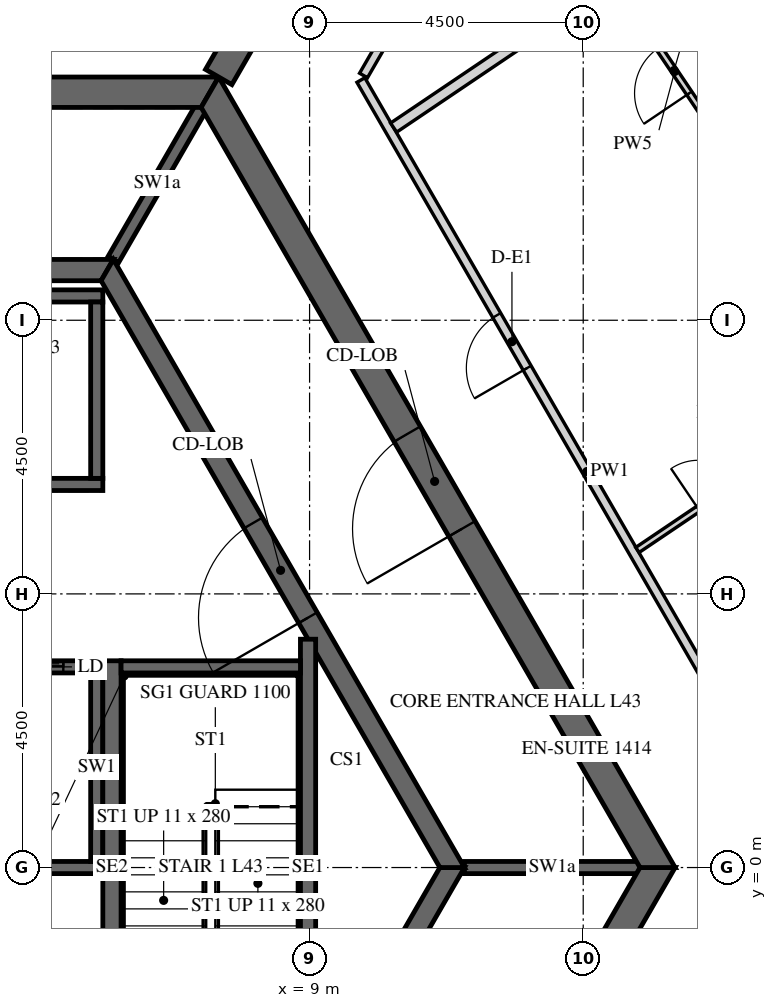
"""IFC4 building model, lengths in metres.
Left out: names, types, materials, properties, quantities, classifications, styles, units other than length and angle.
Written with IfcOpenShell. Run it as: python <this file> out.ifc"""

import sys

from ifc_helpers import new_model, si_unit, direction, frame, frame_2d, origin, place, context, subcontext, project, spatial, polyline, rectangle, outline, extrude, element, fill, save


model = new_model("IFC4")
c1 = context("Model", 3, precision=1e-05, world=origin(), true_north=direction((0.0, 1.0)))
c2 = subcontext(c1, "Body", "Model", "MODEL_VIEW")
j1 = project(units=[si_unit("LENGTHUNIT", "METRE"), si_unit("PLANEANGLEUNIT", "RADIAN")], contexts=[c1])
p1 = place(None, origin())
s1 = spatial("IfcSite", under=j1, at=p1, CompositionType="ELEMENT")
p2 = place(p1, origin())
s2 = spatial("IfcBuilding", under=s1, at=p2, CompositionType="ELEMENT")
p3 = place(p2, frame((0.0, 0.0, 183.9)))
s3 = spatial("IfcBuildingStorey", under=s2, at=p3, CompositionType="ELEMENT", Elevation=183.9)
p4 = place(p3, frame((7.361, -12.75, -0.15), z_axis=(0.0, 0.0, 1.0), x_axis=(0.50000571537, 0.866022103989, 0.0)))
e1 = element("IfcWall", 1, at=p4, inside=s3, PredefinedType="SHEAR", context=c2, shape_type="SweptSolid", body=[
    extrude(outline(polyline([(-0.144, -0.25), (14.867, -0.25), (14.578, 0.25), (0.144, 0.25), (-0.144, -0.25)])), origin(), (0.0, 0.0, 1.0), 3.9),
])
p5 = place(p4, frame((6.49, 0.0, 0.15)))
e2 = element("IfcOpeningElement", 2, at=p5, cuts=e1, PredefinedType="OPENING", context=c2, shape_type="SweptSolid", body=[
    extrude(rectangle(XDim=1.8, YDim=2.4, at=frame_2d((0.9, 1.2))), frame((0.0, 0.26, 0.0), z_axis=(0.0, -1.0, 0.0), x_axis=(1.0, 0.0, 0.0)), (0.0, 0.0, 1.0), 0.52),
])
p6 = place(p3, frame((14.722, 0.0, -0.15), z_axis=(0.0, 0.0, 1.0), x_axis=(-0.50000571537, 0.866022103989, 0.0)))
e3 = element("IfcWall", 3, at=p6, inside=s3, PredefinedType="SHEAR", context=c2, shape_type="SweptSolid", body=[
    extrude(outline(polyline([(-0.144, -0.25), (14.867, -0.25), (14.578, 0.25), (0.144, 0.25), (-0.144, -0.25)])), origin(), (0.0, 0.0, 1.0), 3.9),
])
p7 = place(p6, frame((6.432, 0.0, 0.15)))
e4 = element("IfcOpeningElement", 4, at=p7, cuts=e3, PredefinedType="OPENING", context=c2, shape_type="SweptSolid", body=[
    extrude(rectangle(XDim=1.8, YDim=2.4, at=frame_2d((0.9, 1.2))), frame((0.0, 0.26, 0.0), z_axis=(0.0, -1.0, 0.0), x_axis=(1.0, 0.0, 0.0)), (0.0, 0.0, 1.0), 0.52),
])
p8 = place(p3, frame((7.361, 12.75, -0.15), z_axis=(0.0, 0.0, 1.0), x_axis=(-1.0, 0.0, 0.0)))
e5 = element("IfcWall", 5, at=p8, inside=s3, PredefinedType="SHEAR", context=c2, shape_type="SweptSolid", body=[
    extrude(outline(polyline([(-0.144, -0.25), (14.866, -0.25), (14.578, 0.25), (0.144, 0.25), (-0.144, -0.25)])), origin(), (0.0, 0.0, 1.0), 3.9),
])
p9 = place(p8, frame((6.761, 0.0, 0.15)))
e6 = element("IfcOpeningElement", 6, at=p9, cuts=e5, PredefinedType="OPENING", context=c2, shape_type="SweptSolid", body=[
    extrude(rectangle(XDim=1.2, YDim=2.4, at=frame_2d((0.6, 1.2))), frame((0.0, 0.26, 0.0), z_axis=(0.0, -1.0, 0.0), x_axis=(1.0, 0.0, 0.0)), (0.0, 0.0, 1.0), 0.52),
])
p10 = place(p3, frame((7.506, 13.0, -0.15), z_axis=(0.0, 0.0, 1.0), x_axis=(0.499988271576, 0.866032175087, 0.0)))
e7 = element("IfcWall", 7, at=p10, inside=s3, PredefinedType="SHEAR", context=c2, shape_type="SweptSolid", body=[
    extrude(rectangle(XDim=15.424, YDim=0.5, at=frame_2d((7.712, 0.0))), origin(), (0.0, 0.0, 1.0), 3.9),
])
p11 = place(p10, frame((6.812, 0.0, 0.15)))
e8 = element("IfcOpeningElement", 8, at=p11, cuts=e7, PredefinedType="OPENING", context=c2, shape_type="SweptSolid", body=[
    extrude(rectangle(XDim=1.8, YDim=2.4, at=frame_2d((0.9, 1.2))), frame((0.0, 0.26, 0.0), z_axis=(0.0, -1.0, 0.0), x_axis=(1.0, 0.0, 0.0)), (0.0, 0.0, 1.0), 0.52),
])
p12 = place(p3, frame((5.673, -9.825, -0.15), z_axis=(0.0, 0.0, 1.0), x_axis=(0.499995046907, 0.866028263435, 0.0)))
e9 = element("IfcWall", 9, at=p12, inside=s3, PredefinedType="SHEAR", context=c2, shape_type="SweptSolid", body=[
    extrude(outline(polyline([(-0.101, -0.175), (11.446, -0.175), (11.244, 0.175), (0.101, 0.175), (-0.101, -0.175)])), origin(), (0.0, 0.0, 1.0), 3.9),
])
p13 = place(p12, frame((4.801, 0.0, 0.15)))
e10 = element("IfcOpeningElement", 10, at=p13, cuts=e9, PredefinedType="OPENING", context=c2, shape_type="SweptSolid", body=[
    extrude(rectangle(XDim=1.8, YDim=2.4, at=frame_2d((0.9, 1.2))), frame((0.0, 0.185, 0.0), z_axis=(0.0, -1.0, 0.0), x_axis=(1.0, 0.0, 0.0)), (0.0, 0.0, 1.0), 0.37),
])
p14 = place(p3, frame((11.345, 0.0, -0.15), z_axis=(0.0, 0.0, 1.0), x_axis=(-0.499995046907, 0.866028263435, 0.0)))
e11 = element("IfcWall", 11, at=p14, inside=s3, PredefinedType="SHEAR", context=c2, shape_type="SweptSolid", body=[
    extrude(outline(polyline([(-0.101, -0.175), (11.446, -0.175), (11.244, 0.175), (0.101, 0.175), (-0.101, -0.175)])), origin(), (0.0, 0.0, 1.0), 3.9),
])
p15 = place(p14, frame((4.744, 0.0, 0.15)))
e12 = element("IfcOpeningElement", 12, at=p15, cuts=e11, PredefinedType="OPENING", context=c2, shape_type="SweptSolid", body=[
    extrude(rectangle(XDim=1.8, YDim=2.4, at=frame_2d((0.9, 1.2))), frame((0.0, 0.185, 0.0), z_axis=(0.0, -1.0, 0.0), x_axis=(1.0, 0.0, 0.0)), (0.0, 0.0, 1.0), 0.37),
])
p16 = place(p3, frame((5.673, 9.825, -0.15), z_axis=(0.0, 0.0, 1.0), x_axis=(-1.0, 0.0, 0.0)))
e13 = element("IfcWall", 13, at=p16, inside=s3, PredefinedType="SHEAR", context=c2, shape_type="SweptSolid", body=[
    extrude(outline(polyline([(-0.101, -0.175), (11.446, -0.175), (11.244, 0.175), (0.101, 0.175), (-0.101, -0.175)])), origin(), (0.0, 0.0, 1.0), 3.9),
])
p17 = place(p3, frame((-5.6, 6.3, -0.25), z_axis=(0.0, 0.0, 1.0), x_axis=(1.0, 0.0, 0.0)))
e14 = element("IfcWall", 14, at=p17, inside=s3, PredefinedType="SHEAR", context=c2, shape_type="SweptSolid", body=[
    extrude(rectangle(XDim=11.2, YDim=0.2, at=frame_2d((5.6, 0.0))), origin(), (0.0, 0.0, 1.0), 3.9),
])
p18 = place(p17, frame((8.45, 0.0, 0.25)))
e15 = element("IfcOpeningElement", 15, at=p18, cuts=e14, PredefinedType="OPENING", context=c2, shape_type="SweptSolid", body=[
    extrude(rectangle(XDim=0.9, YDim=2.1, at=frame_2d((0.45, 1.05))), frame((0.0, 0.11, 0.0), z_axis=(0.0, -1.0, 0.0), x_axis=(1.0, 0.0, 0.0)), (0.0, 0.0, 1.0), 0.22),
])
p19 = place(p17, frame((0.65, 0.0, 0.25)))
e16 = element("IfcOpeningElement", 16, at=p19, cuts=e14, PredefinedType="OPENING", context=c2, shape_type="SweptSolid", body=[
    extrude(rectangle(XDim=1.1, YDim=2.1, at=frame_2d((0.55, 1.05))), frame((0.0, 0.11, 0.0), z_axis=(0.0, -1.0, 0.0), x_axis=(1.0, 0.0, 0.0)), (0.0, 0.0, 1.0), 0.22),
])
p20 = place(p17, frame((2.85, 0.0, 0.25)))
e17 = element("IfcOpeningElement", 17, at=p20, cuts=e14, PredefinedType="OPENING", context=c2, shape_type="SweptSolid", body=[
    extrude(rectangle(XDim=1.1, YDim=2.1, at=frame_2d((0.55, 1.05))), frame((0.0, 0.11, 0.0), z_axis=(0.0, -1.0, 0.0), x_axis=(1.0, 0.0, 0.0)), (0.0, 0.0, 1.0), 0.22),
])
p21 = place(p17, frame((5.05, 0.0, 0.25)))
e18 = element("IfcOpeningElement", 18, at=p21, cuts=e14, PredefinedType="OPENING", context=c2, shape_type="SweptSolid", body=[
    extrude(rectangle(XDim=1.1, YDim=2.1, at=frame_2d((0.55, 1.05))), frame((0.0, 0.11, 0.0), z_axis=(0.0, -1.0, 0.0), x_axis=(1.0, 0.0, 0.0)), (0.0, 0.0, 1.0), 0.22),
])
p22 = place(p3, frame((-5.6, 9.4, -0.25), z_axis=(0.0, 0.0, 1.0), x_axis=(1.0, 0.0, 0.0)))
e19 = element("IfcWall", 19, at=p22, inside=s3, PredefinedType="SHEAR", context=c2, shape_type="SweptSolid", body=[
    extrude(rectangle(XDim=11.2, YDim=0.2, at=frame_2d((5.6, 0.0))), origin(), (0.0, 0.0, 1.0), 3.9),
])
p23 = place(p3, frame((5.5, 6.4, -0.25), z_axis=(0.0, 0.0, 1.0), x_axis=(0.0, 1.0, 0.0)))
e20 = element("IfcWall", 20, at=p23, inside=s3, PredefinedType="SHEAR", context=c2, shape_type="SweptSolid", body=[
    extrude(rectangle(XDim=2.9, YDim=0.2, at=frame_2d((1.45, 0.0))), origin(), (0.0, 0.0, 1.0), 3.9),
])
p24 = place(p3, frame((-5.6, 3.3, -0.25), z_axis=(0.0, 0.0, 1.0), x_axis=(1.0, 0.0, 0.0)))
e21 = element("IfcWall", 21, at=p24, inside=s3, PredefinedType="SHEAR", context=c2, shape_type="SweptSolid", body=[
    extrude(rectangle(XDim=11.2, YDim=0.2, at=frame_2d((5.6, 0.0))), origin(), (0.0, 0.0, 1.0), 3.9),
])
p25 = place(p24, frame((0.65, 0.0, 0.25)))
e22 = element("IfcOpeningElement", 22, at=p25, cuts=e21, PredefinedType="OPENING", context=c2, shape_type="SweptSolid", body=[
    extrude(rectangle(XDim=1.1, YDim=2.1, at=frame_2d((0.55, 1.05))), frame((0.0, 0.11, 0.0), z_axis=(0.0, -1.0, 0.0), x_axis=(1.0, 0.0, 0.0)), (0.0, 0.0, 1.0), 0.22),
])
p26 = place(p24, frame((2.85, 0.0, 0.25)))
e23 = element("IfcOpeningElement", 23, at=p26, cuts=e21, PredefinedType="OPENING", context=c2, shape_type="SweptSolid", body=[
    extrude(rectangle(XDim=1.1, YDim=2.1, at=frame_2d((0.55, 1.05))), frame((0.0, 0.11, 0.0), z_axis=(0.0, -1.0, 0.0), x_axis=(1.0, 0.0, 0.0)), (0.0, 0.0, 1.0), 0.22),
])
p27 = place(p24, frame((5.05, 0.0, 0.25)))
e24 = element("IfcOpeningElement", 24, at=p27, cuts=e21, PredefinedType="OPENING", context=c2, shape_type="SweptSolid", body=[
    extrude(rectangle(XDim=1.1, YDim=2.1, at=frame_2d((0.55, 1.05))), frame((0.0, 0.11, 0.0), z_axis=(0.0, -1.0, 0.0), x_axis=(1.0, 0.0, 0.0)), (0.0, 0.0, 1.0), 0.22),
])
p28 = place(p24, frame((7.25, 0.0, 0.25)))
e25 = element("IfcOpeningElement", 25, at=p28, cuts=e21, PredefinedType="OPENING", context=c2, shape_type="SweptSolid", body=[
    extrude(rectangle(XDim=1.1, YDim=2.1, at=frame_2d((0.55, 1.05))), frame((0.0, 0.11, 0.0), z_axis=(0.0, -1.0, 0.0), x_axis=(1.0, 0.0, 0.0)), (0.0, 0.0, 1.0), 0.22),
])
p29 = place(p24, frame((9.45, 0.0, 0.25)))
e26 = element("IfcOpeningElement", 26, at=p29, cuts=e21, PredefinedType="OPENING", context=c2, shape_type="SweptSolid", body=[
    extrude(rectangle(XDim=1.1, YDim=2.1, at=frame_2d((0.55, 1.05))), frame((0.0, 0.11, 0.0), z_axis=(0.0, -1.0, 0.0), x_axis=(1.0, 0.0, 0.0)), (0.0, 0.0, 1.0), 0.22),
])
p30 = place(p3, frame((-5.6, 0.0, -0.25), z_axis=(0.0, 0.0, 1.0), x_axis=(1.0, 0.0, 0.0)))
e27 = element("IfcWall", 27, at=p30, inside=s3, PredefinedType="SHEAR", context=c2, shape_type="SweptSolid", body=[
    extrude(rectangle(XDim=11.2, YDim=0.2, at=frame_2d((5.6, 0.0))), origin(), (0.0, 0.0, 1.0), 3.9),
])
p31 = place(p3, frame((5.5, 0.1, -0.25), z_axis=(0.0, 0.0, 1.0), x_axis=(0.0, 1.0, 0.0)))
e28 = element("IfcWall", 28, at=p31, inside=s3, PredefinedType="SHEAR", context=c2, shape_type="SweptSolid", body=[
    extrude(rectangle(XDim=3.1, YDim=0.2, at=frame_2d((1.55, 0.0))), origin(), (0.0, 0.0, 1.0), 3.9),
])
for number, where, z_axis, x_axis in (
    (29, (11.547, 0.0, -0.15), (0.0, 0.0, 1.0), (1.0, 0.0, 0.0)),
    (30, (5.773, 10.0, -0.15), (0.0, 0.0, 1.0), (0.5, 0.866, 0.0)),
):
    element("IfcWall", number, at=place(p3, frame(where, z_axis=z_axis, x_axis=x_axis)), inside=s3, PredefinedType="SHEAR", context=c2, shape_type="SweptSolid", body=[
        extrude(rectangle(XDim=2.887, YDim=0.2, at=frame_2d((1.443, 0.0))), origin(), (0.0, 0.0, 1.0), 3.9),
    ])
p32 = place(p3, frame((5.75, -3.4, -0.25), z_axis=(0.0, 0.0, 1.0), x_axis=(0.0, 1.0, 0.0)))
e31 = element("IfcWall", 31, at=p32, inside=s3, PredefinedType="SHEAR", context=c2, shape_type="SweptSolid", body=[
    extrude(rectangle(XDim=6.8, YDim=0.3, at=frame_2d((3.4, 0.0))), origin(), (0.0, 0.0, 1.0), 3.9),
])
p33 = place(p3, frame((8.975, -3.755, -0.25), z_axis=(0.0, 0.0, 1.0), x_axis=(0.0, 1.0, 0.0)))
e32 = element("IfcWall", 32, at=p33, inside=s3, PredefinedType="SHEAR", context=c2, shape_type="SweptSolid", body=[
    extrude(rectangle(XDim=7.51, YDim=0.25, at=frame_2d((3.755, 0.0))), origin(), (0.0, 0.0, 1.0), 3.9),
])
p34 = place(p3, frame((5.9, 3.3, -0.25), z_axis=(0.0, 0.0, 1.0), x_axis=(1.0, 0.0, 0.0)))
e33 = element("IfcWall", 33, at=p34, inside=s3, PredefinedType="SHEAR", context=c2, shape_type="SweptSolid", body=[
    extrude(rectangle(XDim=2.95, YDim=0.2, at=frame_2d((1.475, 0.0))), origin(), (0.0, 0.0, 1.0), 3.9),
])
p35 = place(p3, frame((9.887, -12.875, 0.0), z_axis=(0.0, 0.0, 1.0), x_axis=(0.499998228944, 0.866026426302, 0.0)))
e34 = element("IfcWall", 34, at=p35, inside=s3, PredefinedType="PARTITIONING", context=c2, shape_type="SweptSolid", body=[
    extrude(rectangle(XDim=14.867, YDim=0.15, at=frame_2d((7.433, 0.0))), origin(), (0.0, 0.0, 1.0), 2.988),
])
p36 = place(p35, frame((8.224, 0.0, 0.0)))
e35 = element("IfcOpeningElement", 35, at=p36, cuts=e34, PredefinedType="OPENING", context=c2, shape_type="SweptSolid", body=[
    extrude(rectangle(XDim=1.0, YDim=2.1, at=frame_2d((0.5, 1.05))), frame((0.0, 0.085, 0.0), z_axis=(0.0, -1.0, 0.0), x_axis=(1.0, 0.0, 0.0)), (0.0, 0.0, 1.0), 0.17),
])
p37 = place(p35, frame((13.717, 0.0, 0.0)))
e36 = element("IfcOpeningElement", 36, at=p37, cuts=e34, PredefinedType="OPENING", context=c2, shape_type="SweptSolid", body=[
    extrude(rectangle(XDim=1.0, YDim=2.1, at=frame_2d((0.5, 1.05))), frame((0.0, 0.085, 0.0), z_axis=(0.0, -1.0, 0.0), x_axis=(1.0, 0.0, 0.0)), (0.0, 0.0, 1.0), 0.17),
])
p38 = place(p3, frame((17.277, 0.075, 0.0), z_axis=(0.0, 0.0, 1.0), x_axis=(-0.499998228944, 0.866026426302, 0.0)))
e37 = element("IfcWall", 37, at=p38, inside=s3, PredefinedType="PARTITIONING", context=c2, shape_type="SweptSolid", body=[
    extrude(rectangle(XDim=14.867, YDim=0.15, at=frame_2d((7.433, 0.0))), origin(), (0.0, 0.0, 1.0), 2.988),
])
p39 = place(p38, frame((9.398, 0.0, 0.0)))
e38 = element("IfcOpeningElement", 38, at=p39, cuts=e37, PredefinedType="OPENING", context=c2, shape_type="SweptSolid", body=[
    extrude(rectangle(XDim=1.0, YDim=2.1, at=frame_2d((0.5, 1.05))), frame((0.0, 0.085, 0.0), z_axis=(0.0, -1.0, 0.0), x_axis=(1.0, 0.0, 0.0)), (0.0, 0.0, 1.0), 0.17),
])
p40 = place(p3, frame((9.887, 13.025, 0.0), z_axis=(0.0, 0.0, 1.0), x_axis=(0.499985955615, 0.866033512162, 0.0)))
e39 = element("IfcWall", 39, at=p40, inside=s3, PredefinedType="PARTITIONING", context=c2, shape_type="SweptSolid", body=[
    extrude(rectangle(XDim=7.699, YDim=0.15, at=frame_2d((3.85, 0.0))), origin(), (0.0, 0.0, 1.0), 2.988),
])
p41 = place(p40, frame((2.106, 0.0, 0.0)))
e40 = element("IfcOpeningElement", 40, at=p41, cuts=e39, PredefinedType="OPENING", context=c2, shape_type="SweptSolid", body=[
    extrude(rectangle(XDim=1.0, YDim=2.1, at=frame_2d((0.5, 1.05))), frame((0.0, 0.085, 0.0), z_axis=(0.0, -1.0, 0.0), x_axis=(1.0, 0.0, 0.0)), (0.0, 0.0, 1.0), 0.17),
])
p42 = place(p3, frame((14.392, 5.223, 0.0), z_axis=(0.0, 0.0, 1.0), x_axis=(0.829015360708, 0.559225832477, 0.0)))
e41 = element("IfcWall", 41, at=p42, inside=s3, PredefinedType="PARTITIONING", context=c2, shape_type="SweptSolid", body=[
    extrude(rectangle(XDim=3.107, YDim=0.1, at=frame_2d((1.553, 0.0))), origin(), (0.0, 0.0, 1.0), 2.988),
])
p43 = place(p42, frame((1.207, 0.0, 0.0)))
e42 = element("IfcOpeningElement", 42, at=p43, cuts=e41, PredefinedType="OPENING", context=c2, shape_type="SweptSolid", body=[
    extrude(rectangle(XDim=0.8, YDim=2.1, at=frame_2d((0.4, 1.05))), frame((0.0, 0.06, 0.0), z_axis=(0.0, -1.0, 0.0), x_axis=(1.0, 0.0, 0.0)), (0.0, 0.0, 1.0), 0.12),
])
p44 = place(p3, frame((15.971, 11.656, 0.0), z_axis=(0.0, 0.0, 1.0), x_axis=(-0.559202575539, 0.829031048581, 0.0)))
e43 = element("IfcWall", 43, at=p44, inside=s3, PredefinedType="PARTITIONING", context=c2, shape_type="SweptSolid", body=[
    extrude(rectangle(XDim=3.46, YDim=0.1, at=frame_2d((1.73, 0.0))), origin(), (0.0, 0.0, 1.0), 2.988),
])
p45 = place(p44, frame((1.3, 0.0, 0.0)))
e44 = element("IfcOpeningElement", 44, at=p45, cuts=e43, PredefinedType="OPENING", context=c2, shape_type="SweptSolid", body=[
    extrude(rectangle(XDim=0.9, YDim=2.1, at=frame_2d((0.45, 1.05))), frame((0.0, 0.06, 0.0), z_axis=(0.0, -1.0, 0.0), x_axis=(1.0, 0.0, 0.0)), (0.0, 0.0, 1.0), 0.12),
])
p46 = place(p3, frame((20.363, 18.9, 0.0), z_axis=(0.0, 0.0, 1.0), x_axis=(-0.829027307641, -0.559208121531, 0.0)))
e45 = element("IfcWall", 45, at=p46, inside=s3, PredefinedType="PARTITIONING", context=c2, shape_type="SweptSolid", body=[
    extrude(rectangle(XDim=12.039, YDim=0.18, at=frame_2d((6.02, 0.0))), origin(), (0.0, 0.0, 1.0), 2.988),
])
p47 = place(p7, origin())
e46 = element("IfcDoor", 46, at=p47, inside=s3, OperationType="DOUBLE_DOOR_SINGLE_SWING", PredefinedType="DOOR", context=c2, shape_type="SweptSolid", body=[
    extrude(rectangle(XDim=1.8, YDim=2.4, at=frame_2d((0.9, 1.2))), frame((0.0, 0.025, 0.0), z_axis=(0.0, -1.0, 0.0), x_axis=(1.0, 0.0, 0.0)), (0.0, 0.0, 1.0), 0.05),
])
fill(e4, e46)
p48 = place(p15, origin())
e47 = element("IfcDoor", 47, at=p48, inside=s3, OperationType="DOUBLE_DOOR_SINGLE_SWING", PredefinedType="DOOR", context=c2, shape_type="SweptSolid", body=[
    extrude(rectangle(XDim=1.8, YDim=2.4, at=frame_2d((0.9, 1.2))), frame((0.0, 0.025, 0.0), z_axis=(0.0, -1.0, 0.0), x_axis=(1.0, 0.0, 0.0)), (0.0, 0.0, 1.0), 0.05),
])
fill(e12, e47)
p49 = place(p29, origin())
e48 = element("IfcDoor", 48, at=p49, inside=s3, OperationType="SLIDING_TO_LEFT", PredefinedType="DOOR", context=c2, shape_type="SweptSolid", body=[
    extrude(rectangle(XDim=1.1, YDim=2.1, at=frame_2d((0.55, 1.05))), frame((0.0, 0.025, 0.0), z_axis=(0.0, -1.0, 0.0), x_axis=(1.0, 0.0, 0.0)), (0.0, 0.0, 1.0), 0.05),
])
fill(e26, e48)
p50 = place(p39, origin())
e49 = element("IfcDoor", 49, at=p50, inside=s3, OperationType="SINGLE_SWING_RIGHT", PredefinedType="DOOR", context=c2, shape_type="SweptSolid", body=[
    extrude(rectangle(XDim=1.0, YDim=2.1, at=frame_2d((0.5, 1.05))), frame((0.0, 0.025, 0.0), z_axis=(0.0, -1.0, 0.0), x_axis=(1.0, 0.0, 0.0)), (0.0, 0.0, 1.0), 0.05),
])
fill(e38, e49)
p51 = place(p45, origin())
e50 = element("IfcDoor", 50, at=p51, inside=s3, OperationType="SINGLE_SWING_LEFT", PredefinedType="DOOR", context=c2, shape_type="SweptSolid", body=[
    extrude(rectangle(XDim=0.9, YDim=2.1, at=frame_2d((0.45, 1.05))), frame((0.0, 0.025, 0.0), z_axis=(0.0, -1.0, 0.0), x_axis=(1.0, 0.0, 0.0)), (0.0, 0.0, 1.0), 0.05),
])
fill(e44, e50)
save(model, sys.argv[1])
